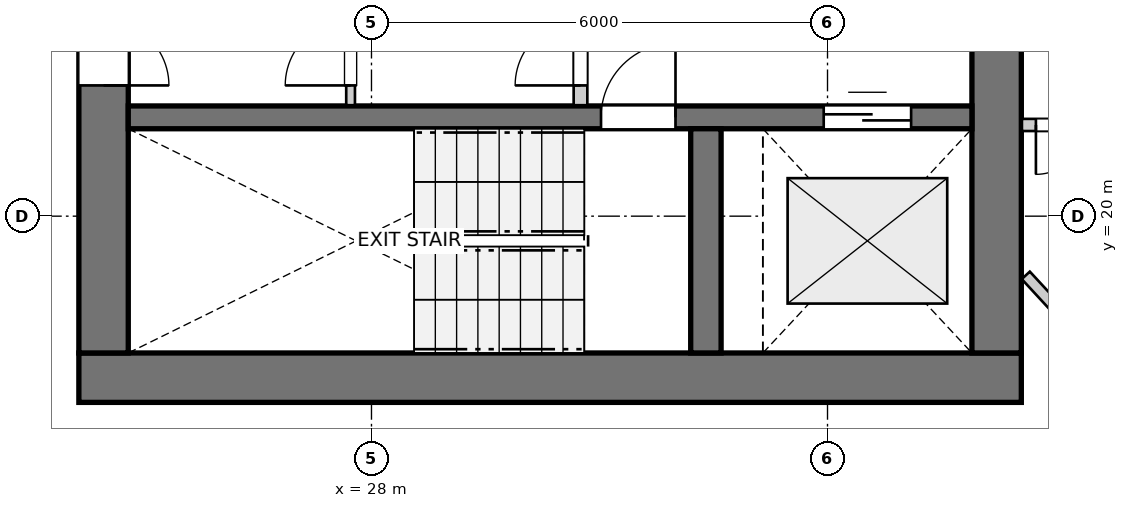
"""IFC4 building model, lengths in metres.
Left out: names, types, materials, properties, quantities, classifications, styles, units other than length and angle.
Written with IfcOpenShell. Run it as: python <this file> out.ifc"""

import sys

from ifc_helpers import new_model, si_unit, direction, frame, frame_2d, origin, place, context, subcontext, project, spatial, rectangle, extrude, source, transform, mapped, element, fill, save


model = new_model("IFC4")
c1 = context("Model", 3, precision=1e-05, world=origin(), true_north=direction((0.0, 1.0)))
c2 = subcontext(c1, "Body", "Model", "MODEL_VIEW")
j1 = project(units=[si_unit("LENGTHUNIT", "METRE"), si_unit("PLANEANGLEUNIT", "RADIAN")], contexts=[c1])
p1 = place(None, origin())
s1 = spatial("IfcSite", under=j1, at=p1, CompositionType="ELEMENT")
p2 = place(p1, origin())
s2 = spatial("IfcBuilding", under=s1, at=p2, CompositionType="ELEMENT")
p3 = place(p2, frame((0.0, 0.0, 142.6)))
s3 = spatial("IfcBuildingStorey", under=s2, at=p3, CompositionType="ELEMENT", Elevation=142.6)
p4 = place(p3, frame((24.15, 17.875, 0.0), z_axis=(0.0, 0.0, 1.0), x_axis=(1.0, 0.0, 0.0)))
e1 = element("IfcWall", 1, at=p4, inside=s3, PredefinedType="SHEAR", context=c2, shape_type="SweptSolid", body=[
    extrude(rectangle(XDim=12.4, YDim=0.65, at=frame_2d((6.2, 0.0))), origin(), (0.0, 0.0, 1.0), 2.95),
])
p5 = place(p3, frame((24.475, 33.8, 0.0), z_axis=(0.0, 0.0, 1.0), x_axis=(0.0, -1.0, 0.0)))
e2 = element("IfcWall", 2, at=p5, inside=s3, PredefinedType="SHEAR", context=c2, shape_type="SweptSolid", body=[
    extrude(rectangle(XDim=15.6, YDim=0.65, at=frame_2d((7.8, 0.0))), origin(), (0.0, 0.0, 1.0), 2.95),
])
p6 = place(p5, frame((7.05, 0.0, 0.0)))
e3 = element("IfcOpeningElement", 3, at=p6, cuts=e2, PredefinedType="OPENING", context=c2, shape_type="SweptSolid", body=[
    extrude(rectangle(XDim=1.5, YDim=2.15, at=frame_2d((0.75, 1.075))), frame((0.0, 0.335, 0.0), z_axis=(0.0, -1.0, 0.0), x_axis=(1.0, 0.0, 0.0)), (0.0, 0.0, 1.0), 0.67),
])
p7 = place(p5, frame((3.52, 0.0, 0.0)))
e4 = element("IfcOpeningElement", 4, at=p7, cuts=e2, PredefinedType="OPENING", context=c2, shape_type="SweptSolid", body=[
    extrude(rectangle(XDim=0.86, YDim=2.05, at=frame_2d((0.43, 1.025))), frame((0.0, 0.335, 0.0), z_axis=(0.0, -1.0, 0.0), x_axis=(1.0, 0.0, 0.0)), (0.0, 0.0, 1.0), 0.67),
])
p8 = place(p5, frame((11.22, 0.0, 0.0)))
e5 = element("IfcOpeningElement", 5, at=p8, cuts=e2, PredefinedType="OPENING", context=c2, shape_type="SweptSolid", body=[
    extrude(rectangle(XDim=0.86, YDim=2.05, at=frame_2d((0.43, 1.025))), frame((0.0, 0.335, 0.0), z_axis=(0.0, -1.0, 0.0), x_axis=(1.0, 0.0, 0.0)), (0.0, 0.0, 1.0), 0.67),
])
p9 = place(p3, frame((36.225, 18.2, 0.0), z_axis=(0.0, 0.0, 1.0), x_axis=(0.0, 1.0, 0.0)))
e6 = element("IfcWall", 6, at=p9, inside=s3, PredefinedType="SHEAR", context=c2, shape_type="SweptSolid", body=[
    extrude(rectangle(XDim=15.6, YDim=0.65, at=frame_2d((7.8, 0.0))), origin(), (0.0, 0.0, 1.0), 2.95),
])
p10 = place(p9, frame((4.25, 0.0, 0.0)))
e7 = element("IfcOpeningElement", 7, at=p10, cuts=e6, PredefinedType="OPENING", context=c2, shape_type="SweptSolid", body=[
    extrude(rectangle(XDim=1.1, YDim=2.15, at=frame_2d((0.55, 1.075))), frame((0.0, 0.335, 0.0), z_axis=(0.0, -1.0, 0.0), x_axis=(1.0, 0.0, 0.0)), (0.0, 0.0, 1.0), 0.67),
])
p11 = place(p9, frame((10.25, 0.0, 0.0)))
e8 = element("IfcOpeningElement", 8, at=p11, cuts=e6, PredefinedType="OPENING", context=c2, shape_type="SweptSolid", body=[
    extrude(rectangle(XDim=1.1, YDim=2.15, at=frame_2d((0.55, 1.075))), frame((0.0, 0.335, 0.0), z_axis=(0.0, -1.0, 0.0), x_axis=(1.0, 0.0, 0.0)), (0.0, 0.0, 1.0), 0.67),
])
p12 = place(p3, frame((24.8, 21.3, 0.0), z_axis=(0.0, 0.0, 1.0), x_axis=(1.0, 0.0, 0.0)))
e9 = element("IfcWall", 9, at=p12, inside=s3, PredefinedType="SHEAR", context=c2, shape_type="SweptSolid", body=[
    extrude(rectangle(XDim=11.1, YDim=0.3, at=frame_2d((5.55, 0.0))), origin(), (0.0, 0.0, 1.0), 2.95),
])
p13 = place(p12, frame((6.22, 0.0, 0.0)))
e10 = element("IfcOpeningElement", 10, at=p13, cuts=e9, PredefinedType="OPENING", context=c2, shape_type="SweptSolid", body=[
    extrude(rectangle(XDim=0.98, YDim=2.15, at=frame_2d((0.49, 1.075))), frame((0.0, 0.16, 0.0), z_axis=(0.0, -1.0, 0.0), x_axis=(1.0, 0.0, 0.0)), (0.0, 0.0, 1.0), 0.32),
])
p14 = place(p12, frame((9.15, 0.0, 0.0)))
e11 = element("IfcOpeningElement", 11, at=p14, cuts=e9, PredefinedType="OPENING", context=c2, shape_type="SweptSolid", body=[
    extrude(rectangle(XDim=1.15, YDim=2.15, at=frame_2d((0.575, 1.075))), frame((0.0, 0.16, 0.0), z_axis=(0.0, -1.0, 0.0), x_axis=(1.0, 0.0, 0.0)), (0.0, 0.0, 1.0), 0.32),
])
p15 = place(p3, frame((32.4, 18.2, 0.0), z_axis=(0.0, 0.0, 1.0), x_axis=(0.0, 1.0, 0.0)))
e12 = element("IfcWall", 12, at=p15, inside=s3, PredefinedType="SHEAR", context=c2, shape_type="SweptSolid", body=[
    extrude(rectangle(XDim=2.95, YDim=0.4, at=frame_2d((1.475, 0.0))), origin(), (0.0, 0.0, 1.0), 2.95),
])
p16 = place(p3, frame((30.75, 21.46, 0.0), z_axis=(0.0, 0.0, 1.0), x_axis=(0.0, 1.0, 0.0)))
e13 = element("IfcWall", 13, at=p16, inside=s3, PredefinedType="PARTITIONING", context=c2, shape_type="SweptSolid", body=[
    extrude(rectangle(XDim=3.11, YDim=0.18, at=frame_2d((1.555, 0.0))), origin(), (0.0, 0.0, 1.0), 2.95),
])
p17 = place(p16, frame((0.26, 0.0, 0.0)))
e14 = element("IfcOpeningElement", 14, at=p17, cuts=e13, PredefinedType="OPENING", context=c2, shape_type="SweptSolid", body=[
    extrude(rectangle(XDim=0.86, YDim=2.05, at=frame_2d((0.43, 1.025))), frame((0.0, 0.1, 0.0), z_axis=(0.0, -1.0, 0.0), x_axis=(1.0, 0.0, 0.0)), (0.0, 0.0, 1.0), 0.2),
])
p18 = place(p3, frame((27.725, 21.46, 0.0), z_axis=(0.0, 0.0, 1.0), x_axis=(0.0, 1.0, 0.0)))
e15 = element("IfcWall", 15, at=p18, inside=s3, PredefinedType="PARTITIONING", context=c2, shape_type="SweptSolid", body=[
    extrude(rectangle(XDim=1.38, YDim=0.115, at=frame_2d((0.69, 0.0))), origin(), (0.0, 0.0, 1.0), 2.95),
])
p19 = place(p18, frame((0.26, 0.0, 0.0)))
e16 = element("IfcOpeningElement", 16, at=p19, cuts=e15, PredefinedType="OPENING", context=c2, shape_type="SweptSolid", body=[
    extrude(rectangle(XDim=0.86, YDim=2.05, at=frame_2d((0.43, 1.025))), frame((0.0, 0.067, 0.0), z_axis=(0.0, -1.0, 0.0), x_axis=(1.0, 0.0, 0.0)), (0.0, 0.0, 1.0), 0.135),
])
p20 = place(p3, frame((38.242, 21.2, 0.0), z_axis=(0.0, 0.0, 1.0), x_axis=(-1.0, 0.0, 0.0)))
e17 = element("IfcWall", 17, at=p20, inside=s3, PredefinedType="PARTITIONING", context=c2, shape_type="SweptSolid", body=[
    extrude(rectangle(XDim=1.684, YDim=0.16, at=frame_2d((0.842, 0.0))), origin(), (0.0, 0.0, 1.0), 2.95),
])
p21 = place(p20, frame((0.2, 0.0, 0.0)))
e18 = element("IfcOpeningElement", 18, at=p21, cuts=e17, PredefinedType="OPENING", context=c2, shape_type="SweptSolid", body=[
    extrude(rectangle(XDim=1.3, YDim=2.1, at=frame_2d((0.65, 1.05))), frame((0.0, 0.09, 0.0), z_axis=(0.0, -1.0, 0.0), x_axis=(1.0, 0.0, 0.0)), (0.0, 0.0, 1.0), 0.18),
])
p22 = place(p3, frame((36.609, 19.221, 0.0), z_axis=(0.0, 0.0, 1.0), x_axis=(0.67832941292, -0.734757924467, 0.0)))
e19 = element("IfcWall", 19, at=p22, inside=s3, PredefinedType="PARTITIONING", context=c2, shape_type="SweptSolid", body=[
    extrude(rectangle(XDim=7.403, YDim=0.145, at=frame_2d((3.701, 0.0))), origin(), (0.0, 0.0, 1.0), 2.95),
])
m1 = source(origin(), c2, "Body", "SweptSolid", [
    extrude(rectangle(XDim=0.98, YDim=2.15, at=frame_2d((0.49, 1.075))), frame((0.0, 0.025, 0.0), z_axis=(0.0, -1.0, 0.0), x_axis=(1.0, 0.0, 0.0)), (0.0, 0.0, 1.0), 0.05),
])
p23 = place(p13, origin())
e20 = element("IfcDoor", 20, at=p23, inside=s3, OperationType="SINGLE_SWING_RIGHT", PredefinedType="DOOR", context=c2, shape_type="MappedRepresentation", body=[
    mapped(m1, transform((0.0, 0.0, 0.0), x_axis=(1.0, 0.0, 0.0), y_axis=(0.0, 1.0, 0.0), z_axis=(0.0, 0.0, 1.0), scale=1.0)),
])
fill(e10, e20)
m2 = source(origin(), c2, "Body", "SweptSolid", [
    extrude(rectangle(XDim=1.15, YDim=2.15, at=frame_2d((0.575, 1.075))), frame((0.0, 0.025, 0.0), z_axis=(0.0, -1.0, 0.0), x_axis=(1.0, 0.0, 0.0)), (0.0, 0.0, 1.0), 0.05),
])
p24 = place(p14, origin())
e21 = element("IfcDoor", 21, at=p24, inside=s3, OperationType="DOUBLE_DOOR_SLIDING", PredefinedType="DOOR", context=c2, shape_type="MappedRepresentation", body=[
    mapped(m2, transform((0.0, 0.0, 0.0), x_axis=(1.0, 0.0, 0.0), y_axis=(0.0, 1.0, 0.0), z_axis=(0.0, 0.0, 1.0), scale=1.0)),
])
fill(e11, e21)
m3 = source(origin(), c2, "Body", "SweptSolid", [
    extrude(rectangle(XDim=0.86, YDim=2.05, at=frame_2d((0.43, 1.025))), frame((0.0, 0.025, 0.0), z_axis=(0.0, -1.0, 0.0), x_axis=(1.0, 0.0, 0.0)), (0.0, 0.0, 1.0), 0.05),
])
p25 = place(p8, origin())
e22 = element("IfcDoor", 22, at=p25, inside=s3, OperationType="SINGLE_SWING_RIGHT", PredefinedType="DOOR", context=c2, shape_type="MappedRepresentation", body=[
    mapped(m3, transform((0.0, 0.0, 0.0), x_axis=(1.0, 0.0, 0.0), y_axis=(0.0, 1.0, 0.0), z_axis=(0.0, 0.0, 1.0), scale=1.0)),
])
fill(e5, e22)
p26 = place(p17, origin())
e23 = element("IfcDoor", 23, at=p26, inside=s3, OperationType="SINGLE_SWING_LEFT", PredefinedType="DOOR", context=c2, shape_type="MappedRepresentation", body=[
    mapped(m3, transform((0.0, 0.0, 0.0), x_axis=(1.0, 0.0, 0.0), y_axis=(0.0, 1.0, 0.0), z_axis=(0.0, 0.0, 1.0), scale=1.0)),
])
fill(e14, e23)
p27 = place(p19, origin())
e24 = element("IfcDoor", 24, at=p27, inside=s3, OperationType="SINGLE_SWING_LEFT", PredefinedType="DOOR", context=c2, shape_type="MappedRepresentation", body=[
    mapped(m3, transform((0.0, 0.0, 0.0), x_axis=(1.0, 0.0, 0.0), y_axis=(0.0, 1.0, 0.0), z_axis=(0.0, 0.0, 1.0), scale=1.0)),
])
fill(e16, e24)
m4 = source(origin(), c2, "Body", "SweptSolid", [
    extrude(rectangle(XDim=1.3, YDim=2.1, at=frame_2d((0.65, 1.05))), frame((0.0, 0.025, 0.0), z_axis=(0.0, -1.0, 0.0), x_axis=(1.0, 0.0, 0.0)), (0.0, 0.0, 1.0), 0.05),
])
p28 = place(p21, origin())
e25 = element("IfcDoor", 25, at=p28, inside=s3, OperationType="DOUBLE_DOOR_SINGLE_SWING", PredefinedType="DOOR", context=c2, shape_type="MappedRepresentation", body=[
    mapped(m4, transform((0.0, 0.0, 0.0), x_axis=(1.0, 0.0, 0.0), y_axis=(0.0, 1.0, 0.0), z_axis=(0.0, 0.0, 1.0), scale=1.0)),
])
fill(e18, e25)
save(model, sys.argv[1])
